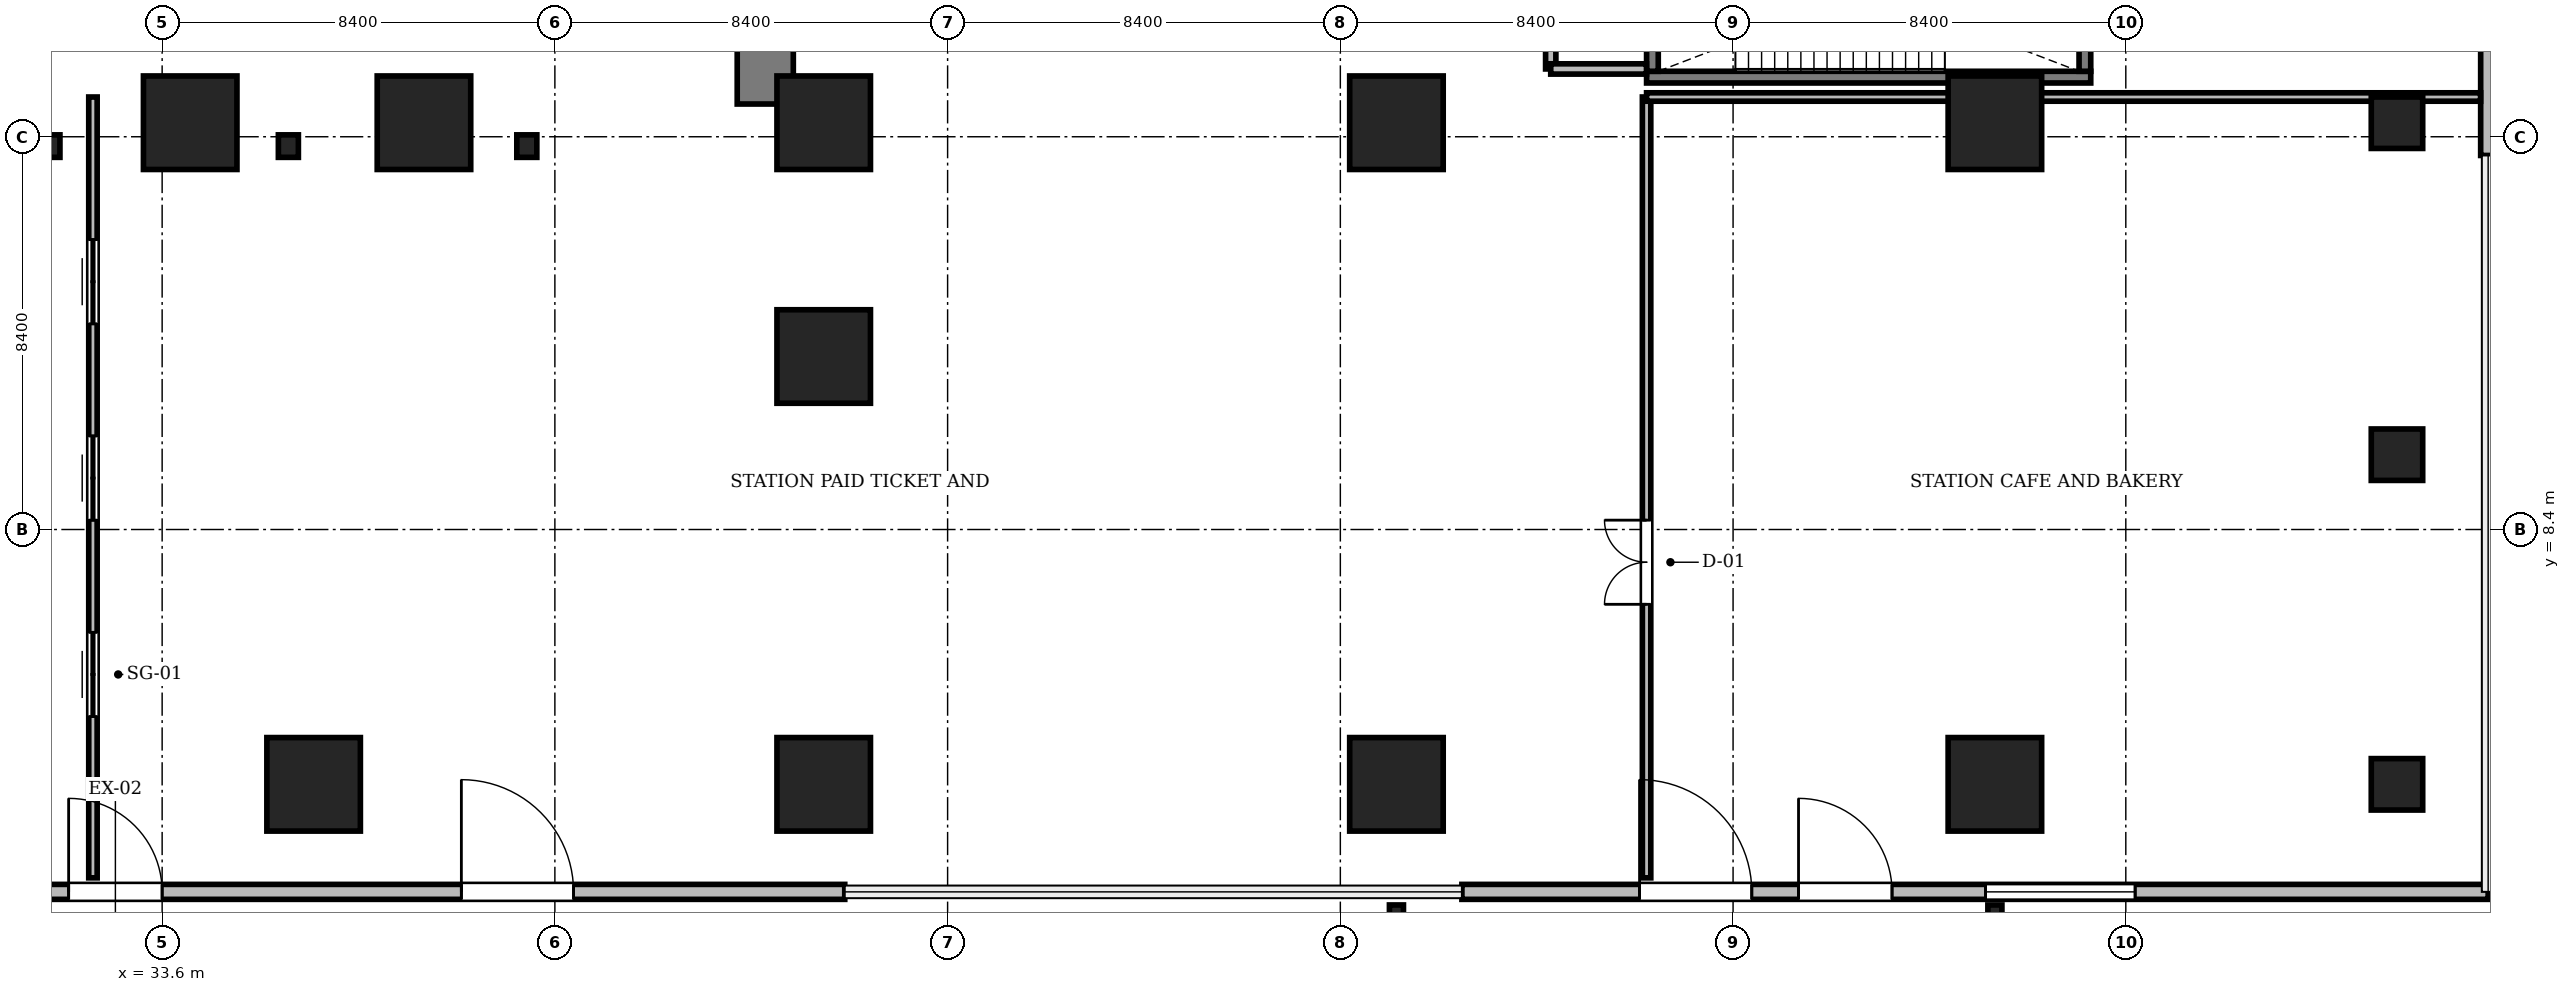
"""IFC4 building model, lengths in metres.
Left out: names, types, materials, properties, quantities, classifications, styles, units other than length and angle.
Written with IfcOpenShell. Run it as: python <this file> out.ifc"""

import sys

from ifc_helpers import new_model, si_unit, direction, frame, frame_2d, origin, origin_2d, place, context, subcontext, project, spatial, rectangle, i_section, extrude, source, transform, mapped, element, fill, save


model = new_model("IFC4")
c1 = context("Model", 3, precision=1e-05, world=origin(), true_north=direction((0.0, 1.0)))
c2 = subcontext(c1, "Body", "Model", "MODEL_VIEW")
j1 = project(units=[si_unit("LENGTHUNIT", "METRE"), si_unit("PLANEANGLEUNIT", "RADIAN")], contexts=[c1])
p1 = place(None, origin())
s1 = spatial("IfcSite", under=j1, at=p1, CompositionType="ELEMENT")
p2 = place(p1, origin())
s2 = spatial("IfcBuilding", under=s1, at=p2, CompositionType="ELEMENT")
p3 = place(p2, origin())
s3 = spatial("IfcBuildingStorey", under=s2, at=p3, CompositionType="ELEMENT", Elevation=0.0)
m1 = source(origin(), c2, "Body", "SweptSolid", [
    extrude(rectangle(XDim=13.15, YDim=1.2, at=frame_2d((6.575, 0.0))), origin(), (0.0, 0.0, 1.0), 5.68),
])
p4 = place(p3, frame((46.5, 17.5, 0.0), z_axis=(0.0, 0.0, 1.0), x_axis=(0.0, 1.0, 0.0)))
e1 = element("IfcWall", 1, at=p4, inside=s3, PredefinedType="SHEAR", context=c2, shape_type="MappedRepresentation", body=[
    mapped(m1, transform((0.0, 0.0, 0.0), scale=1.0)),
])
m2 = source(origin(), c2, "Body", "SweptSolid", [
    extrude(i_section(OverallWidth=0.428, OverallDepth=0.481, WebThickness=0.04, FlangeThickness=0.063, FilletRadius=0.015, at=origin_2d()), origin(), (0.0, 0.0, 1.0), 5.68),
])
for number, where, z_axis, x_axis in (
    (2, (31.2, 16.6, 0.0), (0.0, 0.0, 1.0), (1.0, 0.0, 0.0)),
    (3, (36.3, 16.6, 0.0), (0.0, 0.0, 1.0), (1.0, 0.0, 0.0)),
    (4, (41.4, 16.6, 0.0), (0.0, 0.0, 1.0), (1.0, 0.0, 0.0)),
):
    element("IfcColumn", number, at=place(p3, frame(where, z_axis=z_axis, x_axis=x_axis)), inside=s3, PredefinedType="COLUMN", context=c2, shape_type="MappedRepresentation", body=[
        mapped(m2, transform((0.0, 0.0, 0.0), scale=1.0)),
    ])
m3 = source(origin(), c2, "Body", "SweptSolid", [
    extrude(rectangle(XDim=2.0, YDim=2.0, at=origin_2d()), origin(), (0.0, 0.0, 1.0), 5.68),
])
for number, where, z_axis, x_axis in (
    (5, (36.84, 2.95, 0.0), (0.0, 0.0, 1.0), (1.0, 0.0, 0.0)),
    (6, (47.75, 2.95, 0.0), (0.0, 0.0, 1.0), (1.0, 0.0, 0.0)),
    (7, (60.0, 2.95, 0.0), (0.0, 0.0, 1.0), (1.0, 0.0, 0.0)),
    (8, (72.8, 2.95, 0.0), (0.0, 0.0, 1.0), (1.0, 0.0, 0.0)),
    (9, (47.75, 12.1, 0.0), (0.0, 0.0, 1.0), (1.0, 0.0, 0.0)),
    (10, (34.2, 17.1, 0.0), (0.0, 0.0, 1.0), (1.0, 0.0, 0.0)),
    (11, (39.2, 17.1, 0.0), (0.0, 0.0, 1.0), (1.0, 0.0, 0.0)),
    (12, (47.75, 17.1, 0.0), (0.0, 0.0, 1.0), (1.0, 0.0, 0.0)),
    (13, (60.0, 17.1, 0.0), (0.0, 0.0, 1.0), (1.0, 0.0, 0.0)),
    (14, (72.8, 17.1, 0.0), (0.0, 0.0, 1.0), (1.0, 0.0, 0.0)),
):
    element("IfcColumn", number, at=place(p3, frame(where, z_axis=z_axis, x_axis=x_axis)), inside=s3, PredefinedType="COLUMN", context=c2, shape_type="MappedRepresentation", body=[
        mapped(m3, transform((0.0, 0.0, 0.0), scale=1.0)),
    ])
m4 = source(origin(), c2, "Body", "SweptSolid", [
    extrude(rectangle(XDim=1.1, YDim=1.1, at=origin_2d()), origin(), (0.0, 0.0, 1.0), 5.68),
])
for number, where, z_axis, x_axis in (
    (15, (81.4, 2.95, 0.0), (0.0, 0.0, 1.0), (1.0, 0.0, 0.0)),
    (16, (81.4, 10.0, 0.0), (0.0, 0.0, 1.0), (1.0, 0.0, 0.0)),
    (17, (81.4, 17.1, 0.0), (0.0, 0.0, 1.0), (1.0, 0.0, 0.0)),
):
    element("IfcColumn", number, at=place(p3, frame(where, z_axis=z_axis, x_axis=x_axis)), inside=s3, PredefinedType="COLUMN", context=c2, shape_type="MappedRepresentation", body=[
        mapped(m4, transform((0.0, 0.0, 0.0), scale=1.0)),
    ])
m5 = source(origin(), c2, "Body", "SweptSolid", [
    extrude(rectangle(XDim=18.4, YDim=0.32, at=frame_2d((9.2, 0.0))), origin(), (0.0, 0.0, 1.0), 5.68),
])
p5 = place(p3, frame((29.8, 0.65, 0.0), z_axis=(0.0, 0.0, 1.0), x_axis=(1.0, 0.0, 0.0)))
e18 = element("IfcWall", 18, at=p5, inside=s3, PredefinedType="SOLIDWALL", context=c2, shape_type="MappedRepresentation", body=[
    mapped(m5, transform((0.0, 0.0, 0.0), scale=1.0)),
])
m6 = source(origin(), c2, "Body", "SweptSolid", [
    extrude(rectangle(XDim=2.0, YDim=2.6, at=frame_2d((1.0, 1.3))), frame((0.0, 0.17, 0.0), z_axis=(0.0, -1.0, 0.0), x_axis=(1.0, 0.0, 0.0)), (0.0, 0.0, 1.0), 0.34),
])
p6 = place(p5, frame((1.8, 0.0, 0.0)))
e19 = element("IfcOpeningElement", 19, at=p6, cuts=e18, PredefinedType="OPENING", context=c2, shape_type="MappedRepresentation", body=[
    mapped(m6, transform((0.0, 0.0, 0.0), scale=1.0)),
])
m7 = source(origin(), c2, "Body", "SweptSolid", [
    extrude(rectangle(XDim=2.4, YDim=2.8, at=frame_2d((1.2, 1.4))), frame((0.0, 0.17, 0.0), z_axis=(0.0, -1.0, 0.0), x_axis=(1.0, 0.0, 0.0)), (0.0, 0.0, 1.0), 0.34),
])
p7 = place(p5, frame((10.2, 0.0, 0.0)))
e20 = element("IfcOpeningElement", 20, at=p7, cuts=e18, PredefinedType="OPENING", context=c2, shape_type="MappedRepresentation", body=[
    mapped(m7, transform((0.0, 0.0, 0.0), scale=1.0)),
])
m8 = source(origin(), c2, "Body", "SweptSolid", [
    extrude(rectangle(XDim=21.95, YDim=0.32, at=frame_2d((10.975, 0.0))), origin(), (0.0, 0.0, 1.0), 5.68),
])
p8 = place(p3, frame((61.4, 0.65, 0.0), z_axis=(0.0, 0.0, 1.0), x_axis=(1.0, 0.0, 0.0)))
e21 = element("IfcWall", 21, at=p8, inside=s3, PredefinedType="SOLIDWALL", context=c2, shape_type="MappedRepresentation", body=[
    mapped(m8, transform((0.0, 0.0, 0.0), scale=1.0)),
])
p9 = place(p8, frame((7.2, 0.0, 0.0)))
e22 = element("IfcOpeningElement", 22, at=p9, cuts=e21, PredefinedType="OPENING", context=c2, shape_type="MappedRepresentation", body=[
    mapped(m6, transform((0.0, 0.0, 0.0), scale=1.0)),
])
p10 = place(p8, frame((3.8, 0.0, 0.0)))
e23 = element("IfcOpeningElement", 23, at=p10, cuts=e21, PredefinedType="OPENING", context=c2, shape_type="MappedRepresentation", body=[
    mapped(m7, transform((0.0, 0.0, 0.0), scale=1.0)),
])
m9 = source(origin(), c2, "Body", "SweptSolid", [
    extrude(rectangle(XDim=3.2, YDim=3.4, at=frame_2d((1.6, 1.7))), frame((0.0, 0.17, 0.0), z_axis=(0.0, -1.0, 0.0), x_axis=(1.0, 0.0, 0.0)), (0.0, 0.0, 1.0), 0.34),
])
p11 = place(p8, frame((11.2, 0.0, 0.85)))
e24 = element("IfcOpeningElement", 24, at=p11, cuts=e21, PredefinedType="OPENING", context=c2, shape_type="MappedRepresentation", body=[
    mapped(m9, transform((0.0, 0.0, 0.0), scale=1.0)),
])
m10 = source(origin(), c2, "Body", "SweptSolid", [
    extrude(rectangle(XDim=23.4, YDim=0.32, at=frame_2d((11.7, 0.0))), origin(), (0.0, 0.0, 1.0), 5.68),
])
p12 = place(p3, frame((83.35, 16.4, 0.0), z_axis=(0.0, 0.0, 1.0), x_axis=(0.0, 1.0, 0.0)))
e25 = element("IfcWall", 25, at=p12, inside=s3, PredefinedType="SOLIDWALL", context=c2, shape_type="MappedRepresentation", body=[
    mapped(m10, transform((0.0, 0.0, 0.0), scale=1.0)),
])
p13 = place(p12, frame((5.45, 0.0, 0.0)))
e26 = element("IfcOpeningElement", 26, at=p13, cuts=e25, PredefinedType="OPENING", context=c2, shape_type="MappedRepresentation", body=[
    mapped(m6, transform((0.0, 0.0, 0.0), scale=1.0)),
])
p14 = place(p12, frame((20.25, 0.0, 0.0)))
e27 = element("IfcOpeningElement", 27, at=p14, cuts=e25, PredefinedType="OPENING", context=c2, shape_type="MappedRepresentation", body=[
    mapped(m6, transform((0.0, 0.0, 0.0), scale=1.0)),
])
p15 = place(p12, frame((9.6, 0.0, 0.85)))
e28 = element("IfcOpeningElement", 28, at=p15, cuts=e25, PredefinedType="OPENING", context=c2, shape_type="MappedRepresentation", body=[
    mapped(m9, transform((0.0, 0.0, 0.0), scale=1.0)),
])
m11 = source(origin(), c2, "Body", "SweptSolid", [
    extrude(i_section(OverallWidth=0.3, OverallDepth=0.5, WebThickness=0.014, FlangeThickness=0.028, FilletRadius=0.027, at=origin_2d()), origin(), (0.0, 0.0, 1.0), 4.65),
])
for number, where, z_axis, x_axis in (
    (29, (60.0, 0.12, 0.0), (0.0, 0.0, 1.0), (1.0, 0.0, 0.0)),
    (30, (72.8, 0.12, 0.0), (0.0, 0.0, 1.0), (1.0, 0.0, 0.0)),
):
    element("IfcColumn", number, at=place(p3, frame(where, z_axis=z_axis, x_axis=x_axis)), inside=s3, PredefinedType="COLUMN", context=c2, shape_type="MappedRepresentation", body=[
        mapped(m11, transform((0.0, 0.0, 0.0), scale=1.0)),
    ])
m12 = source(origin(), c2, "Body", "SweptSolid", [
    extrude(rectangle(XDim=9.5, YDim=0.25, at=frame_2d((4.75, 0.0))), origin(), (0.0, 0.0, 1.0), 5.8),
])
p16 = place(p3, frame((65.35, 18.075, 0.0), z_axis=(0.0, 0.0, 1.0), x_axis=(1.0, 0.0, 0.0)))
e31 = element("IfcWall", 31, at=p16, inside=s3, PredefinedType="SOLIDWALL", context=c2, shape_type="MappedRepresentation", body=[
    mapped(m12, transform((0.0, 0.0, 0.0), scale=1.0)),
])
m13 = source(origin(), c2, "Body", "SweptSolid", [
    extrude(rectangle(XDim=3.45, YDim=0.25, at=frame_2d((1.725, 0.0))), origin(), (0.0, 0.0, 1.0), 5.8),
])
p17 = place(p3, frame((74.725, 18.2, 0.0), z_axis=(0.0, 0.0, 1.0), x_axis=(0.0, 1.0, 0.0)))
e32 = element("IfcWall", 32, at=p17, inside=s3, PredefinedType="SOLIDWALL", context=c2, shape_type="MappedRepresentation", body=[
    mapped(m13, transform((0.0, 0.0, 0.0), scale=1.0)),
])
p18 = place(p3, frame((65.475, 18.2, 0.0), z_axis=(0.0, 0.0, 1.0), x_axis=(0.0, 1.0, 0.0)))
e33 = element("IfcWall", 33, at=p18, inside=s3, PredefinedType="SOLIDWALL", context=c2, shape_type="MappedRepresentation", body=[
    mapped(m13, transform((0.0, 0.0, 0.0), scale=1.0)),
])
m14 = source(origin(), c2, "Body", "SweptSolid", [
    extrude(rectangle(XDim=1.1, YDim=2.2, at=frame_2d((0.55, 1.1))), frame((0.0, 0.135, 0.0), z_axis=(0.0, -1.0, 0.0), x_axis=(1.0, 0.0, 0.0)), (0.0, 0.0, 1.0), 0.27),
])
p19 = place(p18, frame((2.0, 0.0, 0.0)))
e34 = element("IfcOpeningElement", 34, at=p19, cuts=e33, PredefinedType="OPENING", context=c2, shape_type="MappedRepresentation", body=[
    mapped(m14, transform((0.0, 0.0, 0.0), scale=1.0)),
])
m15 = source(origin(), c2, "Body", "SweptSolid", [
    extrude(rectangle(XDim=16.7, YDim=0.18, at=frame_2d((8.35, 0.0))), origin(), (0.0, 0.0, 1.0), 5.148),
])
p20 = place(p3, frame((32.12, 0.95, 0.0), z_axis=(0.0, 0.0, 1.0), x_axis=(0.0, 1.0, 0.0)))
e35 = element("IfcWall", 35, at=p20, inside=s3, PredefinedType="PARTITIONING", context=c2, shape_type="MappedRepresentation", body=[
    mapped(m15, transform((0.0, 0.0, 0.0), scale=1.0)),
])
m16 = source(origin(), c2, "Body", "SweptSolid", [
    extrude(rectangle(XDim=1.8, YDim=2.2, at=frame_2d((0.9, 1.1))), frame((0.0, 0.1, 0.0), z_axis=(0.0, -1.0, 0.0), x_axis=(1.0, 0.0, 0.0)), (0.0, 0.0, 1.0), 0.2),
])
p21 = place(p20, frame((3.45, 0.0, 0.0)))
e36 = element("IfcOpeningElement", 36, at=p21, cuts=e35, PredefinedType="OPENING", context=c2, shape_type="MappedRepresentation", body=[
    mapped(m16, transform((0.0, 0.0, 0.0), scale=1.0)),
])
p22 = place(p20, frame((7.65, 0.0, 0.0)))
e37 = element("IfcOpeningElement", 37, at=p22, cuts=e35, PredefinedType="OPENING", context=c2, shape_type="MappedRepresentation", body=[
    mapped(m16, transform((0.0, 0.0, 0.0), scale=1.0)),
])
p23 = place(p20, frame((11.85, 0.0, 0.0)))
e38 = element("IfcOpeningElement", 38, at=p23, cuts=e35, PredefinedType="OPENING", context=c2, shape_type="MappedRepresentation", body=[
    mapped(m16, transform((0.0, 0.0, 0.0), scale=1.0)),
])
p24 = place(p3, frame((65.35, 0.95, 0.0), z_axis=(0.0, 0.0, 1.0), x_axis=(0.0, 1.0, 0.0)))
e39 = element("IfcWall", 39, at=p24, inside=s3, PredefinedType="PARTITIONING", context=c2, shape_type="MappedRepresentation", body=[
    mapped(m15, transform((0.0, 0.0, 0.0), scale=1.0)),
])
m17 = source(origin(), c2, "Body", "SweptSolid", [
    extrude(rectangle(XDim=1.8, YDim=2.4, at=frame_2d((0.9, 1.2))), frame((0.0, 0.1, 0.0), z_axis=(0.0, -1.0, 0.0), x_axis=(1.0, 0.0, 0.0)), (0.0, 0.0, 1.0), 0.2),
])
p25 = place(p24, frame((5.85, 0.0, 0.0)))
e40 = element("IfcOpeningElement", 40, at=p25, cuts=e39, PredefinedType="OPENING", context=c2, shape_type="MappedRepresentation", body=[
    mapped(m17, transform((0.0, 0.0, 0.0), scale=1.0)),
])
m18 = source(origin(), c2, "Body", "SweptSolid", [
    extrude(rectangle(XDim=5.97, YDim=0.22, at=frame_2d((2.985, 0.0))), origin(), (0.0, 0.0, 1.0), 5.68),
])
p26 = place(p3, frame((63.3, 18.25, 0.0), z_axis=(0.0, 0.0, 1.0), x_axis=(0.0, 1.0, 0.0)))
e41 = element("IfcWall", 41, at=p26, inside=s3, PredefinedType="SOLIDWALL", context=c2, shape_type="MappedRepresentation", body=[
    mapped(m18, transform((0.0, 0.0, 0.0), scale=1.0)),
])
m19 = source(origin(), c2, "Body", "SweptSolid", [
    extrude(rectangle(XDim=1.2, YDim=2.2, at=frame_2d((0.6, 1.1))), frame((0.0, 0.12, 0.0), z_axis=(0.0, -1.0, 0.0), x_axis=(1.0, 0.0, 0.0)), (0.0, 0.0, 1.0), 0.24),
])
p27 = place(p26, frame((1.2, 0.0, 0.0)))
e42 = element("IfcOpeningElement", 42, at=p27, cuts=e41, PredefinedType="OPENING", context=c2, shape_type="MappedRepresentation", body=[
    mapped(m19, transform((0.0, 0.0, 0.0), scale=1.0)),
])
m20 = source(origin(), c2, "Body", "SweptSolid", [
    extrude(rectangle(XDim=17.838, YDim=0.18, at=frame_2d((8.919, 0.0))), origin(), (0.0, 0.0, 1.0), 5.072),
])
p28 = place(p3, frame((65.35, 17.65, 0.0), z_axis=(0.0, 0.0, 1.0), x_axis=(1.0, 0.0, 0.0)))
e43 = element("IfcWall", 43, at=p28, inside=s3, PredefinedType="PARTITIONING", context=c2, shape_type="MappedRepresentation", body=[
    mapped(m20, transform((0.0, 0.0, 0.0), scale=1.0)),
])
m21 = source(origin(), c2, "Body", "SweptSolid", [
    extrude(rectangle(XDim=2.048, YDim=0.22, at=frame_2d((1.024, 0.0))), origin(), (0.0, 0.0, 1.0), 5.68),
])
p29 = place(p3, frame((63.3, 18.25, 0.0), z_axis=(0.0, 0.0, 1.0), x_axis=(1.0, 0.0, 0.0)))
e44 = element("IfcWall", 44, at=p29, inside=s3, PredefinedType="SOLIDWALL", context=c2, shape_type="MappedRepresentation", body=[
    mapped(m21, transform((0.0, 0.0, 0.0), scale=1.0)),
])
m22 = source(origin(), c2, "Body", "SweptSolid", [
    extrude(rectangle(XDim=2.0, YDim=2.6, at=frame_2d((1.0, 1.3))), frame((0.0, 0.025, 0.0), z_axis=(0.0, -1.0, 0.0), x_axis=(1.0, 0.0, 0.0)), (0.0, 0.0, 1.0), 0.05),
])
p30 = place(p6, frame((2.0, 0.0, 0.0), z_axis=(0.0, 0.0, 1.0), x_axis=(-1.0, 0.0, 0.0)))
e45 = element("IfcDoor", 45, at=p30, inside=s3, OperationType="DOUBLE_DOOR_SINGLE_SWING", PredefinedType="DOOR", context=c2, shape_type="MappedRepresentation", body=[
    mapped(m22, transform((0.0, 0.0, 0.0), scale=1.0)),
])
fill(e19, e45)
m23 = source(origin(), c2, "Body", "SweptSolid", [
    extrude(rectangle(XDim=2.4, YDim=2.8, at=frame_2d((1.2, 1.4))), frame((0.0, 0.025, 0.0), z_axis=(0.0, -1.0, 0.0), x_axis=(1.0, 0.0, 0.0)), (0.0, 0.0, 1.0), 0.05),
])
p31 = place(p7, frame((2.4, 0.0, 0.0), z_axis=(0.0, 0.0, 1.0), x_axis=(-1.0, 0.0, 0.0)))
e46 = element("IfcDoor", 46, at=p31, inside=s3, OperationType="DOUBLE_DOOR_SINGLE_SWING", PredefinedType="DOOR", context=c2, shape_type="MappedRepresentation", body=[
    mapped(m23, transform((0.0, 0.0, 0.0), scale=1.0)),
])
fill(e20, e46)
p32 = place(p9, frame((2.0, 0.0, 0.0), z_axis=(0.0, 0.0, 1.0), x_axis=(-1.0, 0.0, 0.0)))
e47 = element("IfcDoor", 47, at=p32, inside=s3, OperationType="DOUBLE_DOOR_SINGLE_SWING", PredefinedType="DOOR", context=c2, shape_type="MappedRepresentation", body=[
    mapped(m22, transform((0.0, 0.0, 0.0), scale=1.0)),
])
fill(e22, e47)
p33 = place(p10, frame((2.4, 0.0, 0.0), z_axis=(0.0, 0.0, 1.0), x_axis=(-1.0, 0.0, 0.0)))
e48 = element("IfcDoor", 48, at=p33, inside=s3, OperationType="DOUBLE_DOOR_SINGLE_SWING", PredefinedType="DOOR", context=c2, shape_type="MappedRepresentation", body=[
    mapped(m23, transform((0.0, 0.0, 0.0), scale=1.0)),
])
fill(e23, e48)
m24 = source(origin(), c2, "Body", "SweptSolid", [
    extrude(rectangle(XDim=3.2, YDim=3.4, at=frame_2d((1.6, 1.7))), frame((0.0, 0.03, 0.0), z_axis=(0.0, -1.0, 0.0), x_axis=(1.0, 0.0, 0.0)), (0.0, 0.0, 1.0), 0.06),
])
p34 = place(p11, origin())
e49 = element("IfcWindow", 49, at=p34, inside=s3, PartitioningType="SINGLE_PANEL", PredefinedType="WINDOW", context=c2, shape_type="MappedRepresentation", body=[
    mapped(m24, transform((0.0, 0.0, 0.0), scale=1.0)),
])
fill(e24, e49)
m25 = source(origin(), c2, "Body", "SweptSolid", [
    extrude(rectangle(XDim=1.8, YDim=2.2, at=frame_2d((0.9, 1.1))), frame((0.0, 0.025, 0.0), z_axis=(0.0, -1.0, 0.0), x_axis=(1.0, 0.0, 0.0)), (0.0, 0.0, 1.0), 0.05),
])
p35 = place(p21, origin())
e50 = element("IfcDoor", 50, at=p35, inside=s3, OperationType="DOUBLE_DOOR_SLIDING", PredefinedType="GATE", context=c2, shape_type="MappedRepresentation", body=[
    mapped(m25, transform((0.0, 0.0, 0.0), scale=1.0)),
])
fill(e36, e50)
p36 = place(p22, origin())
e51 = element("IfcDoor", 51, at=p36, inside=s3, OperationType="DOUBLE_DOOR_SLIDING", PredefinedType="GATE", context=c2, shape_type="MappedRepresentation", body=[
    mapped(m25, transform((0.0, 0.0, 0.0), scale=1.0)),
])
fill(e37, e51)
p37 = place(p23, origin())
e52 = element("IfcDoor", 52, at=p37, inside=s3, OperationType="DOUBLE_DOOR_SLIDING", PredefinedType="GATE", context=c2, shape_type="MappedRepresentation", body=[
    mapped(m25, transform((0.0, 0.0, 0.0), scale=1.0)),
])
fill(e38, e52)
m26 = source(origin(), c2, "Body", "SweptSolid", [
    extrude(rectangle(XDim=1.8, YDim=2.4, at=frame_2d((0.9, 1.2))), frame((0.0, 0.025, 0.0), z_axis=(0.0, -1.0, 0.0), x_axis=(1.0, 0.0, 0.0)), (0.0, 0.0, 1.0), 0.05),
])
p38 = place(p25, origin())
e53 = element("IfcDoor", 53, at=p38, inside=s3, OperationType="DOUBLE_DOOR_SINGLE_SWING", PredefinedType="DOOR", context=c2, shape_type="MappedRepresentation", body=[
    mapped(m26, transform((0.0, 0.0, 0.0), scale=1.0)),
])
fill(e40, e53)
save(model, sys.argv[1])
